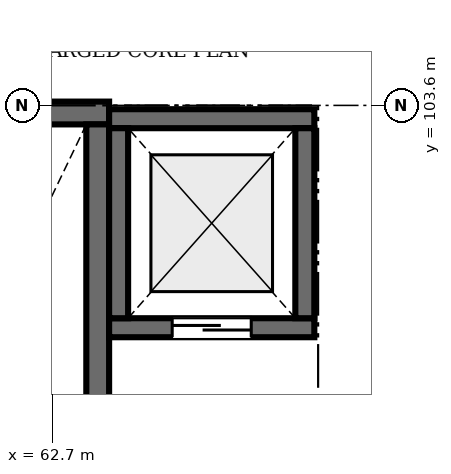
"""IFC4 building model, lengths in metres.
Left out: names, types, materials, properties, quantities, classifications, styles, units other than length and angle.
Written with IfcOpenShell. Run it as: python <this file> out.ifc"""

import sys

from ifc_helpers import new_model, si_unit, direction, frame, frame_2d, origin, place, context, subcontext, project, spatial, rectangle, extrude, element, fill, save


model = new_model("IFC4")
c1 = context("Model", 3, precision=1e-05, world=origin(), true_north=direction((0.0, 1.0)))
c2 = subcontext(c1, "Body", "Model", "MODEL_VIEW")
j1 = project(units=[si_unit("LENGTHUNIT", "METRE"), si_unit("PLANEANGLEUNIT", "RADIAN")], contexts=[c1])
p1 = place(None, origin())
s1 = spatial("IfcSite", under=j1, at=p1, CompositionType="ELEMENT")
p2 = place(p1, origin())
s2 = spatial("IfcBuilding", under=s1, at=p2, CompositionType="ELEMENT")
p3 = place(p2, frame((0.0, 0.0, 14.7)))
s3 = spatial("IfcBuildingStorey", under=s2, at=p3, CompositionType="ELEMENT", Elevation=14.7)
p4 = place(p3, frame((59.75, 103.5, 0.0), z_axis=(0.0, 0.0, 1.0), x_axis=(1.0, 0.0, 0.0)))
e1 = element("IfcWall", 1, at=p4, inside=s3, PredefinedType="SHEAR", context=c2, shape_type="SweptSolid", body=[
    extrude(rectangle(XDim=3.7, YDim=0.3, at=frame_2d((1.85, 0.0))), origin(), (0.0, 0.0, 1.0), 4.5),
])
p5 = place(p3, frame((63.3, 95.45, 0.0), z_axis=(0.0, 0.0, 1.0), x_axis=(0.0, 1.0, 0.0)))
e2 = element("IfcWall", 2, at=p5, inside=s3, PredefinedType="SHEAR", context=c2, shape_type="SweptSolid", body=[
    extrude(rectangle(XDim=7.9, YDim=0.3, at=frame_2d((3.95, 0.0))), origin(), (0.0, 0.0, 1.0), 4.5),
])
p6 = place(p3, frame((63.45, 100.675, 0.0), z_axis=(0.0, 0.0, 1.0), x_axis=(1.0, 0.0, 0.0)))
e3 = element("IfcWall", 3, at=p6, inside=s3, PredefinedType="SHEAR", context=c2, shape_type="SweptSolid", body=[
    extrude(rectangle(XDim=2.7, YDim=0.25, at=frame_2d((1.35, 0.0))), origin(), (0.0, 0.0, 1.0), 4.5),
])
p7 = place(p6, frame((0.83, 0.0, 0.0)))
e4 = element("IfcOpeningElement", 4, at=p7, cuts=e3, PredefinedType="OPENING", context=c2, shape_type="SweptSolid", body=[
    extrude(rectangle(XDim=1.04, YDim=2.15, at=frame_2d((0.52, 1.075))), frame((0.0, 0.135, 0.0), z_axis=(0.0, -1.0, 0.0), x_axis=(1.0, 0.0, 0.0)), (0.0, 0.0, 1.0), 0.27),
])
p8 = place(p3, frame((63.45, 103.425, 0.0), z_axis=(0.0, 0.0, 1.0), x_axis=(1.0, 0.0, 0.0)))
e5 = element("IfcWall", 5, at=p8, inside=s3, PredefinedType="SHEAR", context=c2, shape_type="SweptSolid", body=[
    extrude(rectangle(XDim=2.7, YDim=0.25, at=frame_2d((1.35, 0.0))), origin(), (0.0, 0.0, 1.0), 4.5),
])
for number, where, z_axis, x_axis in (
    (6, (63.575, 100.8, 0.0), (0.0, 0.0, 1.0), (0.0, 1.0, 0.0)),
    (7, (66.025, 100.8, 0.0), (0.0, 0.0, 1.0), (0.0, 1.0, 0.0)),
):
    element("IfcWall", number, at=place(p3, frame(where, z_axis=z_axis, x_axis=x_axis)), inside=s3, PredefinedType="SHEAR", context=c2, shape_type="SweptSolid", body=[
        extrude(rectangle(XDim=2.5, YDim=0.25, at=frame_2d((1.25, 0.0))), origin(), (0.0, 0.0, 1.0), 4.5),
    ])
p9 = place(p7, origin())
e8 = element("IfcDoor", 8, at=p9, inside=s3, OperationType="SLIDING_TO_LEFT", PredefinedType="DOOR", context=c2, shape_type="SweptSolid", body=[
    extrude(rectangle(XDim=1.04, YDim=2.15, at=frame_2d((0.52, 1.075))), frame((0.0, 0.025, 0.0), z_axis=(0.0, -1.0, 0.0), x_axis=(1.0, 0.0, 0.0)), (0.0, 0.0, 1.0), 0.05),
])
fill(e4, e8)
save(model, sys.argv[1])
